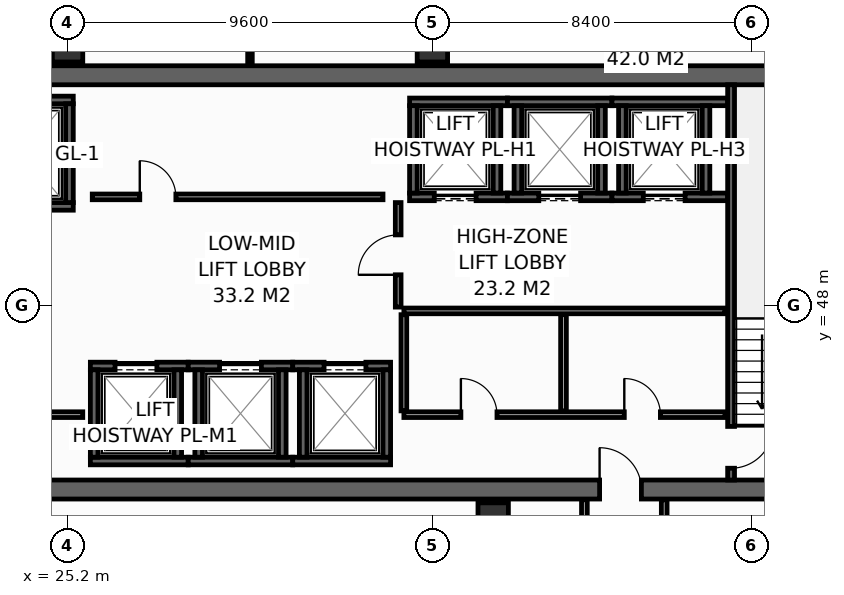
"""IFC4 building model, lengths in metres.
Left out: names, types, materials, properties, quantities, classifications, styles, units other than length and angle.
Written with IfcOpenShell. Run it as: python <this file> out.ifc"""

import sys

from ifc_helpers import new_model, si_unit, direction, frame, frame_2d, origin, origin_2d, place, context, subcontext, project, spatial, rectangle, hollow_rectangle, extrude, element, fill, save


model = new_model("IFC4")
c1 = context("Model", 3, precision=1e-05, world=origin(), true_north=direction((0.0, 1.0)))
c2 = subcontext(c1, "Body", "Model", "MODEL_VIEW")
j1 = project(units=[si_unit("LENGTHUNIT", "METRE"), si_unit("PLANEANGLEUNIT", "RADIAN")], contexts=[c1])
p1 = place(None, origin())
s1 = spatial("IfcSite", under=j1, at=p1, CompositionType="ELEMENT")
p2 = place(p1, origin())
s2 = spatial("IfcBuilding", under=s1, at=p2, CompositionType="ELEMENT")
p3 = place(p2, frame((0.0, 0.0, 220.8)))
s3 = spatial("IfcBuildingStorey", under=s2, at=p3, CompositionType="ELEMENT", Elevation=220.8)
p4 = place(p3, frame((13.6, 43.15, 0.0), z_axis=(0.0, 0.0, 1.0), x_axis=(1.0, 0.0, 0.0)))
e1 = element("IfcWall", 1, at=p4, inside=s3, PredefinedType="SHEAR", context=c2, shape_type="SweptSolid", body=[
    extrude(rectangle(XDim=32.7, YDim=0.5, at=frame_2d((16.35, 0.0))), origin(), (0.0, 0.0, 1.0), 3.35),
])
p5 = place(p4, frame((5.4, 0.0, 0.0)))
e2 = element("IfcOpeningElement", 2, at=p5, cuts=e1, PredefinedType="OPENING", context=c2, shape_type="SweptSolid", body=[
    extrude(rectangle(XDim=1.1, YDim=2.15, at=frame_2d((0.55, 1.075))), frame((0.0, 0.26, 0.0), z_axis=(0.0, -1.0, 0.0), x_axis=(1.0, 0.0, 0.0)), (0.0, 0.0, 1.0), 0.52),
])
p6 = place(p4, frame((25.6, 0.0, 0.0)))
e3 = element("IfcOpeningElement", 3, at=p6, cuts=e1, PredefinedType="OPENING", context=c2, shape_type="SweptSolid", body=[
    extrude(rectangle(XDim=1.1, YDim=2.15, at=frame_2d((0.55, 1.075))), frame((0.0, 0.26, 0.0), z_axis=(0.0, -1.0, 0.0), x_axis=(1.0, 0.0, 0.0)), (0.0, 0.0, 1.0), 0.52),
])
p7 = place(p3, frame((13.6, 54.05, 0.0), z_axis=(0.0, 0.0, 1.0), x_axis=(1.0, 0.0, 0.0)))
e4 = element("IfcWall", 4, at=p7, inside=s3, PredefinedType="SHEAR", context=c2, shape_type="SweptSolid", body=[
    extrude(rectangle(XDim=32.7, YDim=0.5, at=frame_2d((16.35, 0.0))), origin(), (0.0, 0.0, 1.0), 3.35),
])
for number, where, z_axis, x_axis in (
    (5, (25.2, 54.8, 0.0), (0.0, 0.0, 1.0), (1.0, 0.0, 0.0)),
    (6, (34.8, 54.8, 0.0), (0.0, 0.0, 1.0), (1.0, 0.0, 0.0)),
    (7, (36.4, 42.4, 0.0), (0.0, 0.0, 1.0), (1.0, 0.0, 0.0)),
):
    element("IfcColumn", number, at=place(p3, frame(where, z_axis=z_axis, x_axis=x_axis)), inside=s3, PredefinedType="COLUMN", context=c2, shape_type="SweptSolid", body=[
        extrude(hollow_rectangle(XDim=0.8, YDim=0.8, WallThickness=0.036, at=origin_2d()), origin(), (0.0, 0.0, 1.0), 3.8),
    ])
p8 = place(p3, frame((22.5, 50.6, 0.0), z_axis=(0.0, 0.0, 1.0), x_axis=(1.0, 0.0, 0.0)))
e8 = element("IfcWall", 8, at=p8, inside=s3, PredefinedType="SHEAR", context=c2, shape_type="SweptSolid", body=[
    extrude(rectangle(XDim=2.85, YDim=0.2, at=frame_2d((1.425, 0.0))), origin(), (0.0, 0.0, 1.0), 3.35),
])
p9 = place(p8, frame((0.925, 0.0, 0.0)))
e9 = element("IfcOpeningElement", 9, at=p9, cuts=e8, PredefinedType="OPENING", context=c2, shape_type="SweptSolid", body=[
    extrude(rectangle(XDim=1.25, YDim=2.3, at=frame_2d((0.625, 1.15))), frame((0.0, 0.11, 0.0), z_axis=(0.0, -1.0, 0.0), x_axis=(1.0, 0.0, 0.0)), (0.0, 0.0, 1.0), 0.22),
])
p10 = place(p3, frame((22.5, 53.4, 0.0), z_axis=(0.0, 0.0, 1.0), x_axis=(1.0, 0.0, 0.0)))
e10 = element("IfcWall", 10, at=p10, inside=s3, PredefinedType="SHEAR", context=c2, shape_type="SweptSolid", body=[
    extrude(rectangle(XDim=2.85, YDim=0.2, at=frame_2d((1.425, 0.0))), origin(), (0.0, 0.0, 1.0), 3.35),
])
p11 = place(p3, frame((25.25, 50.7, 0.0), z_axis=(0.0, 0.0, 1.0), x_axis=(0.0, 1.0, 0.0)))
e11 = element("IfcWall", 11, at=p11, inside=s3, PredefinedType="SHEAR", context=c2, shape_type="SweptSolid", body=[
    extrude(rectangle(XDim=2.6, YDim=0.2, at=frame_2d((1.3, 0.0))), origin(), (0.0, 0.0, 1.0), 3.35),
])
p12 = place(p3, frame((25.8, 43.9, 0.0), z_axis=(0.0, 0.0, 1.0), x_axis=(1.0, 0.0, 0.0)))
e12 = element("IfcWall", 12, at=p12, inside=s3, PredefinedType="SHEAR", context=c2, shape_type="SweptSolid", body=[
    extrude(rectangle(XDim=2.575, YDim=0.2, at=frame_2d((1.288, 0.0))), origin(), (0.0, 0.0, 1.0), 3.13),
])
p13 = place(p3, frame((25.8, 46.4, 0.0), z_axis=(0.0, 0.0, 1.0), x_axis=(1.0, 0.0, 0.0)))
e13 = element("IfcWall", 13, at=p13, inside=s3, PredefinedType="SHEAR", context=c2, shape_type="SweptSolid", body=[
    extrude(rectangle(XDim=2.575, YDim=0.2, at=frame_2d((1.288, 0.0))), origin(), (0.0, 0.0, 1.0), 3.13),
])
p14 = place(p13, frame((0.65, 0.0, 0.0)))
e14 = element("IfcOpeningElement", 14, at=p14, cuts=e13, PredefinedType="OPENING", context=c2, shape_type="SweptSolid", body=[
    extrude(rectangle(XDim=1.1, YDim=2.2, at=frame_2d((0.55, 1.1))), frame((0.0, 0.11, 0.0), z_axis=(0.0, -1.0, 0.0), x_axis=(1.0, 0.0, 0.0)), (0.0, 0.0, 1.0), 0.22),
])
for number, where, z_axis, x_axis in (
    (15, (25.9, 44.0, 0.0), (0.0, 0.0, 1.0), (0.0, 1.0, 0.0)),
    (16, (28.1, 44.0, 0.0), (0.0, 0.0, 1.0), (0.0, 1.0, 0.0)),
):
    element("IfcWall", number, at=place(p3, frame(where, z_axis=z_axis, x_axis=x_axis)), inside=s3, PredefinedType="SHEAR", context=c2, shape_type="SweptSolid", body=[
        extrude(rectangle(XDim=2.3, YDim=0.2, at=frame_2d((1.15, 0.0))), origin(), (0.0, 0.0, 1.0), 3.13),
    ])
p15 = place(p3, frame((28.375, 43.9, 0.0), z_axis=(0.0, 0.0, 1.0), x_axis=(1.0, 0.0, 0.0)))
e17 = element("IfcWall", 17, at=p15, inside=s3, PredefinedType="SHEAR", context=c2, shape_type="SweptSolid", body=[
    extrude(rectangle(XDim=2.75, YDim=0.2, at=frame_2d((1.375, 0.0))), origin(), (0.0, 0.0, 1.0), 3.13),
])
p16 = place(p3, frame((28.375, 46.4, 0.0), z_axis=(0.0, 0.0, 1.0), x_axis=(1.0, 0.0, 0.0)))
e18 = element("IfcWall", 18, at=p16, inside=s3, PredefinedType="SHEAR", context=c2, shape_type="SweptSolid", body=[
    extrude(rectangle(XDim=2.75, YDim=0.2, at=frame_2d((1.375, 0.0))), origin(), (0.0, 0.0, 1.0), 3.13),
])
p17 = place(p16, frame((0.825, 0.0, 0.0)))
e19 = element("IfcOpeningElement", 19, at=p17, cuts=e18, PredefinedType="OPENING", context=c2, shape_type="SweptSolid", body=[
    extrude(rectangle(XDim=1.1, YDim=2.2, at=frame_2d((0.55, 1.1))), frame((0.0, 0.11, 0.0), z_axis=(0.0, -1.0, 0.0), x_axis=(1.0, 0.0, 0.0)), (0.0, 0.0, 1.0), 0.22),
])
for number, where, z_axis, x_axis in (
    (20, (28.65, 44.0, 0.0), (0.0, 0.0, 1.0), (0.0, 1.0, 0.0)),
    (21, (30.85, 44.0, 0.0), (0.0, 0.0, 1.0), (0.0, 1.0, 0.0)),
):
    element("IfcWall", number, at=place(p3, frame(where, z_axis=z_axis, x_axis=x_axis)), inside=s3, PredefinedType="SHEAR", context=c2, shape_type="SweptSolid", body=[
        extrude(rectangle(XDim=2.3, YDim=0.2, at=frame_2d((1.15, 0.0))), origin(), (0.0, 0.0, 1.0), 3.13),
    ])
p18 = place(p3, frame((31.125, 43.9, 0.0), z_axis=(0.0, 0.0, 1.0), x_axis=(1.0, 0.0, 0.0)))
e22 = element("IfcWall", 22, at=p18, inside=s3, PredefinedType="SHEAR", context=c2, shape_type="SweptSolid", body=[
    extrude(rectangle(XDim=2.575, YDim=0.2, at=frame_2d((1.288, 0.0))), origin(), (0.0, 0.0, 1.0), 3.13),
])
p19 = place(p3, frame((31.125, 46.4, 0.0), z_axis=(0.0, 0.0, 1.0), x_axis=(1.0, 0.0, 0.0)))
e23 = element("IfcWall", 23, at=p19, inside=s3, PredefinedType="SHEAR", context=c2, shape_type="SweptSolid", body=[
    extrude(rectangle(XDim=2.575, YDim=0.2, at=frame_2d((1.288, 0.0))), origin(), (0.0, 0.0, 1.0), 3.13),
])
p20 = place(p19, frame((0.825, 0.0, 0.0)))
e24 = element("IfcOpeningElement", 24, at=p20, cuts=e23, PredefinedType="OPENING", context=c2, shape_type="SweptSolid", body=[
    extrude(rectangle(XDim=1.1, YDim=2.2, at=frame_2d((0.55, 1.1))), frame((0.0, 0.11, 0.0), z_axis=(0.0, -1.0, 0.0), x_axis=(1.0, 0.0, 0.0)), (0.0, 0.0, 1.0), 0.22),
])
for number, where, z_axis, x_axis in (
    (25, (31.4, 44.0, 0.0), (0.0, 0.0, 1.0), (0.0, 1.0, 0.0)),
    (26, (33.6, 44.0, 0.0), (0.0, 0.0, 1.0), (0.0, 1.0, 0.0)),
):
    element("IfcWall", number, at=place(p3, frame(where, z_axis=z_axis, x_axis=x_axis)), inside=s3, PredefinedType="SHEAR", context=c2, shape_type="SweptSolid", body=[
        extrude(rectangle(XDim=2.3, YDim=0.2, at=frame_2d((1.15, 0.0))), origin(), (0.0, 0.0, 1.0), 3.13),
    ])
p21 = place(p3, frame((34.2, 50.85, 0.0), z_axis=(0.0, 0.0, 1.0), x_axis=(1.0, 0.0, 0.0)))
e27 = element("IfcWall", 27, at=p21, inside=s3, PredefinedType="SHEAR", context=c2, shape_type="SweptSolid", body=[
    extrude(rectangle(XDim=2.575, YDim=0.2, at=frame_2d((1.288, 0.0))), origin(), (0.0, 0.0, 1.0), 3.35),
])
p22 = place(p21, frame((0.65, 0.0, 0.0)))
e28 = element("IfcOpeningElement", 28, at=p22, cuts=e27, PredefinedType="OPENING", context=c2, shape_type="SweptSolid", body=[
    extrude(rectangle(XDim=1.1, YDim=2.2, at=frame_2d((0.55, 1.1))), frame((0.0, 0.11, 0.0), z_axis=(0.0, -1.0, 0.0), x_axis=(1.0, 0.0, 0.0)), (0.0, 0.0, 1.0), 0.22),
])
p23 = place(p3, frame((34.2, 53.35, 0.0), z_axis=(0.0, 0.0, 1.0), x_axis=(1.0, 0.0, 0.0)))
e29 = element("IfcWall", 29, at=p23, inside=s3, PredefinedType="SHEAR", context=c2, shape_type="SweptSolid", body=[
    extrude(rectangle(XDim=2.575, YDim=0.2, at=frame_2d((1.288, 0.0))), origin(), (0.0, 0.0, 1.0), 3.35),
])
for number, where, z_axis, x_axis in (
    (30, (34.3, 50.95, 0.0), (0.0, 0.0, 1.0), (0.0, 1.0, 0.0)),
    (31, (36.5, 50.95, 0.0), (0.0, 0.0, 1.0), (0.0, 1.0, 0.0)),
):
    element("IfcWall", number, at=place(p3, frame(where, z_axis=z_axis, x_axis=x_axis)), inside=s3, PredefinedType="SHEAR", context=c2, shape_type="SweptSolid", body=[
        extrude(rectangle(XDim=2.3, YDim=0.2, at=frame_2d((1.15, 0.0))), origin(), (0.0, 0.0, 1.0), 3.35),
    ])
p24 = place(p3, frame((36.775, 50.85, 0.0), z_axis=(0.0, 0.0, 1.0), x_axis=(1.0, 0.0, 0.0)))
e32 = element("IfcWall", 32, at=p24, inside=s3, PredefinedType="SHEAR", context=c2, shape_type="SweptSolid", body=[
    extrude(rectangle(XDim=2.75, YDim=0.2, at=frame_2d((1.375, 0.0))), origin(), (0.0, 0.0, 1.0), 3.35),
])
p25 = place(p24, frame((0.825, 0.0, 0.0)))
e33 = element("IfcOpeningElement", 33, at=p25, cuts=e32, PredefinedType="OPENING", context=c2, shape_type="SweptSolid", body=[
    extrude(rectangle(XDim=1.1, YDim=2.2, at=frame_2d((0.55, 1.1))), frame((0.0, 0.11, 0.0), z_axis=(0.0, -1.0, 0.0), x_axis=(1.0, 0.0, 0.0)), (0.0, 0.0, 1.0), 0.22),
])
p26 = place(p3, frame((36.775, 53.35, 0.0), z_axis=(0.0, 0.0, 1.0), x_axis=(1.0, 0.0, 0.0)))
e34 = element("IfcWall", 34, at=p26, inside=s3, PredefinedType="SHEAR", context=c2, shape_type="SweptSolid", body=[
    extrude(rectangle(XDim=2.75, YDim=0.2, at=frame_2d((1.375, 0.0))), origin(), (0.0, 0.0, 1.0), 3.35),
])
for number, where, z_axis, x_axis in (
    (35, (37.05, 50.95, 0.0), (0.0, 0.0, 1.0), (0.0, 1.0, 0.0)),
    (36, (39.25, 50.95, 0.0), (0.0, 0.0, 1.0), (0.0, 1.0, 0.0)),
):
    element("IfcWall", number, at=place(p3, frame(where, z_axis=z_axis, x_axis=x_axis)), inside=s3, PredefinedType="SHEAR", context=c2, shape_type="SweptSolid", body=[
        extrude(rectangle(XDim=2.3, YDim=0.2, at=frame_2d((1.15, 0.0))), origin(), (0.0, 0.0, 1.0), 3.35),
    ])
p27 = place(p3, frame((39.525, 50.85, 0.0), z_axis=(0.0, 0.0, 1.0), x_axis=(1.0, 0.0, 0.0)))
e37 = element("IfcWall", 37, at=p27, inside=s3, PredefinedType="SHEAR", context=c2, shape_type="SweptSolid", body=[
    extrude(rectangle(XDim=3.045, YDim=0.2, at=frame_2d((1.522, 0.0))), origin(), (0.0, 0.0, 1.0), 3.35),
])
p28 = place(p27, frame((0.825, 0.0, 0.0)))
e38 = element("IfcOpeningElement", 38, at=p28, cuts=e37, PredefinedType="OPENING", context=c2, shape_type="SweptSolid", body=[
    extrude(rectangle(XDim=1.1, YDim=2.2, at=frame_2d((0.55, 1.1))), frame((0.0, 0.11, 0.0), z_axis=(0.0, -1.0, 0.0), x_axis=(1.0, 0.0, 0.0)), (0.0, 0.0, 1.0), 0.22),
])
p29 = place(p3, frame((39.525, 53.35, 0.0), z_axis=(0.0, 0.0, 1.0), x_axis=(1.0, 0.0, 0.0)))
e39 = element("IfcWall", 39, at=p29, inside=s3, PredefinedType="SHEAR", context=c2, shape_type="SweptSolid", body=[
    extrude(rectangle(XDim=3.045, YDim=0.2, at=frame_2d((1.522, 0.0))), origin(), (0.0, 0.0, 1.0), 3.35),
])
for number, where, z_axis, x_axis in (
    (40, (39.8, 50.95, 0.0), (0.0, 0.0, 1.0), (0.0, 1.0, 0.0)),
    (41, (42.0, 50.95, 0.0), (0.0, 0.0, 1.0), (0.0, 1.0, 0.0)),
):
    element("IfcWall", number, at=place(p3, frame(where, z_axis=z_axis, x_axis=x_axis)), inside=s3, PredefinedType="SHEAR", context=c2, shape_type="SweptSolid", body=[
        extrude(rectangle(XDim=2.3, YDim=0.2, at=frame_2d((1.15, 0.0))), origin(), (0.0, 0.0, 1.0), 3.35),
    ])
p30 = place(p3, frame((42.66, 53.8, 0.0), z_axis=(0.0, 0.0, 1.0), x_axis=(0.0, -1.0, 0.0)))
e42 = element("IfcWall", 42, at=p30, inside=s3, PredefinedType="SHEAR", context=c2, shape_type="SweptSolid", body=[
    extrude(rectangle(XDim=10.4, YDim=0.18, at=frame_2d((5.2, 0.0))), origin(), (0.0, 0.0, 1.0), 3.35),
])
p31 = place(p30, frame((8.99, 0.0, 0.0)))
e43 = element("IfcOpeningElement", 43, at=p31, cuts=e42, PredefinedType="OPENING", context=c2, shape_type="SweptSolid", body=[
    extrude(rectangle(XDim=1.1, YDim=2.15, at=frame_2d((0.55, 1.075))), frame((0.0, 0.1, 0.0), z_axis=(0.0, -1.0, 0.0), x_axis=(1.0, 0.0, 0.0)), (0.0, 0.0, 1.0), 0.2),
])
p32 = place(p3, frame((22.68, 45.12, 0.0), z_axis=(0.0, 0.0, 1.0), x_axis=(1.0, 0.0, 0.0)))
e44 = element("IfcWall", 44, at=p32, inside=s3, PredefinedType="PARTITIONING", context=c2, shape_type="SweptSolid", body=[
    extrude(rectangle(XDim=2.92, YDim=0.15, at=frame_2d((1.46, 0.0))), origin(), (0.0, 0.0, 1.0), 3.35),
])
p33 = place(p32, frame((0.85, 0.0, 0.0)))
e45 = element("IfcOpeningElement", 45, at=p33, cuts=e44, PredefinedType="OPENING", context=c2, shape_type="SweptSolid", body=[
    extrude(rectangle(XDim=1.1, YDim=2.15, at=frame_2d((0.55, 1.075))), frame((0.0, 0.085, 0.0), z_axis=(0.0, -1.0, 0.0), x_axis=(1.0, 0.0, 0.0)), (0.0, 0.0, 1.0), 0.17),
])
p34 = place(p3, frame((33.9, 47.95, 0.0), z_axis=(0.0, 0.0, 1.0), x_axis=(0.0, 1.0, 0.0)))
e46 = element("IfcWall", 46, at=p34, inside=s3, PredefinedType="PARTITIONING", context=c2, shape_type="SweptSolid", body=[
    extrude(rectangle(XDim=2.75, YDim=0.15, at=frame_2d((1.375, 0.0))), origin(), (0.0, 0.0, 1.0), 3.35),
])
p35 = place(p34, frame((0.85, 0.0, 0.0)))
e47 = element("IfcOpeningElement", 47, at=p35, cuts=e46, PredefinedType="OPENING", context=c2, shape_type="SweptSolid", body=[
    extrude(rectangle(XDim=1.05, YDim=2.15, at=frame_2d((0.525, 1.075))), frame((0.0, 0.085, 0.0), z_axis=(0.0, -1.0, 0.0), x_axis=(1.0, 0.0, 0.0)), (0.0, 0.0, 1.0), 0.17),
])
p36 = place(p3, frame((34.05, 45.12, 0.0), z_axis=(0.0, 0.0, 1.0), x_axis=(1.0, 0.0, 0.0)))
e48 = element("IfcWall", 48, at=p36, inside=s3, PredefinedType="PARTITIONING", context=c2, shape_type="SweptSolid", body=[
    extrude(rectangle(XDim=8.45, YDim=0.15, at=frame_2d((4.225, 0.0))), origin(), (0.0, 0.0, 1.0), 3.35),
])
p37 = place(p36, frame((1.5, 0.0, 0.0)))
e49 = element("IfcOpeningElement", 49, at=p37, cuts=e48, PredefinedType="OPENING", context=c2, shape_type="SweptSolid", body=[
    extrude(rectangle(XDim=0.95, YDim=2.15, at=frame_2d((0.475, 1.075))), frame((0.0, 0.085, 0.0), z_axis=(0.0, -1.0, 0.0), x_axis=(1.0, 0.0, 0.0)), (0.0, 0.0, 1.0), 0.17),
])
p38 = place(p36, frame((5.8, 0.0, 0.0)))
e50 = element("IfcOpeningElement", 50, at=p38, cuts=e48, PredefinedType="OPENING", context=c2, shape_type="SweptSolid", body=[
    extrude(rectangle(XDim=0.95, YDim=2.15, at=frame_2d((0.475, 1.075))), frame((0.0, 0.085, 0.0), z_axis=(0.0, -1.0, 0.0), x_axis=(1.0, 0.0, 0.0)), (0.0, 0.0, 1.0), 0.17),
])
p39 = place(p3, frame((34.05, 47.85, 0.0), z_axis=(0.0, 0.0, 1.0), x_axis=(1.0, 0.0, 0.0)))
e51 = element("IfcWall", 51, at=p39, inside=s3, PredefinedType="PARTITIONING", context=c2, shape_type="SweptSolid", body=[
    extrude(rectangle(XDim=8.45, YDim=0.15, at=frame_2d((4.225, 0.0))), origin(), (0.0, 0.0, 1.0), 3.35),
])
for number, where, z_axis, x_axis in (
    (52, (38.25, 45.22, 0.0), (0.0, 0.0, 1.0), (0.0, 1.0, 0.0)),
    (53, (34.05, 45.22, 0.0), (0.0, 0.0, 1.0), (0.0, 1.0, 0.0)),
):
    element("IfcWall", number, at=place(p3, frame(where, z_axis=z_axis, x_axis=x_axis)), inside=s3, PredefinedType="PARTITIONING", context=c2, shape_type="SweptSolid", body=[
        extrude(rectangle(XDim=2.53, YDim=0.15, at=frame_2d((1.265, 0.0))), origin(), (0.0, 0.0, 1.0), 3.35),
    ])
p40 = place(p3, frame((25.85, 50.85, 0.0), z_axis=(0.0, 0.0, 1.0), x_axis=(1.0, 0.0, 0.0)))
e54 = element("IfcWall", 54, at=p40, inside=s3, PredefinedType="PARTITIONING", context=c2, shape_type="SweptSolid", body=[
    extrude(rectangle(XDim=7.65, YDim=0.15, at=frame_2d((3.825, 0.0))), origin(), (0.0, 0.0, 1.0), 3.35),
])
p41 = place(p40, frame((1.25, 0.0, 0.0)))
e55 = element("IfcOpeningElement", 55, at=p41, cuts=e54, PredefinedType="OPENING", context=c2, shape_type="SweptSolid", body=[
    extrude(rectangle(XDim=0.95, YDim=2.15, at=frame_2d((0.475, 1.075))), frame((0.0, 0.085, 0.0), z_axis=(0.0, -1.0, 0.0), x_axis=(1.0, 0.0, 0.0)), (0.0, 0.0, 1.0), 0.17),
])
p42 = place(p3, frame((30.0, 54.32, 0.0), z_axis=(0.0, 0.0, 1.0), x_axis=(0.0, 1.0, 0.0)))
e56 = element("IfcWall", 56, at=p42, inside=s3, PredefinedType="PARTITIONING", context=c2, shape_type="SweptSolid", body=[
    extrude(rectangle(XDim=1.675, YDim=0.12, at=frame_2d((0.837, 0.0))), origin(), (0.0, 0.0, 1.0), 2.735),
])
for number, where, z_axis, x_axis in (
    (57, (38.8, 40.75, 0.0), (0.0, 0.0, 1.0), (0.0, 1.0, 0.0)),
    (58, (40.9, 40.75, 0.0), (0.0, 0.0, 1.0), (0.0, 1.0, 0.0)),
):
    element("IfcWall", number, at=place(p3, frame(where, z_axis=z_axis, x_axis=x_axis)), inside=s3, PredefinedType="PARTITIONING", context=c2, shape_type="SweptSolid", body=[
        extrude(rectangle(XDim=2.13, YDim=0.15, at=frame_2d((1.065, 0.0))), origin(), (0.0, 0.0, 1.0), 3.35),
    ])
p43 = place(p14, origin())
e59 = element("IfcDoor", 59, at=p43, inside=s3, OperationType="SLIDING_TO_LEFT", PredefinedType="DOOR", context=c2, shape_type="SweptSolid", body=[
    extrude(rectangle(XDim=1.1, YDim=2.2, at=frame_2d((0.55, 1.1))), frame((0.0, 0.025, 0.0), z_axis=(0.0, -1.0, 0.0), x_axis=(1.0, 0.0, 0.0)), (0.0, 0.0, 1.0), 0.05),
])
fill(e14, e59)
p44 = place(p17, origin())
e60 = element("IfcDoor", 60, at=p44, inside=s3, OperationType="SLIDING_TO_LEFT", PredefinedType="DOOR", context=c2, shape_type="SweptSolid", body=[
    extrude(rectangle(XDim=1.1, YDim=2.2, at=frame_2d((0.55, 1.1))), frame((0.0, 0.025, 0.0), z_axis=(0.0, -1.0, 0.0), x_axis=(1.0, 0.0, 0.0)), (0.0, 0.0, 1.0), 0.05),
])
fill(e19, e60)
p45 = place(p20, origin())
e61 = element("IfcDoor", 61, at=p45, inside=s3, OperationType="SLIDING_TO_LEFT", PredefinedType="DOOR", context=c2, shape_type="SweptSolid", body=[
    extrude(rectangle(XDim=1.1, YDim=2.2, at=frame_2d((0.55, 1.1))), frame((0.0, 0.025, 0.0), z_axis=(0.0, -1.0, 0.0), x_axis=(1.0, 0.0, 0.0)), (0.0, 0.0, 1.0), 0.05),
])
fill(e24, e61)
p46 = place(p22, origin())
e62 = element("IfcDoor", 62, at=p46, inside=s3, OperationType="SLIDING_TO_LEFT", PredefinedType="DOOR", context=c2, shape_type="SweptSolid", body=[
    extrude(rectangle(XDim=1.1, YDim=2.2, at=frame_2d((0.55, 1.1))), frame((0.0, 0.025, 0.0), z_axis=(0.0, -1.0, 0.0), x_axis=(1.0, 0.0, 0.0)), (0.0, 0.0, 1.0), 0.05),
])
fill(e28, e62)
p47 = place(p25, origin())
e63 = element("IfcDoor", 63, at=p47, inside=s3, OperationType="SLIDING_TO_LEFT", PredefinedType="DOOR", context=c2, shape_type="SweptSolid", body=[
    extrude(rectangle(XDim=1.1, YDim=2.2, at=frame_2d((0.55, 1.1))), frame((0.0, 0.025, 0.0), z_axis=(0.0, -1.0, 0.0), x_axis=(1.0, 0.0, 0.0)), (0.0, 0.0, 1.0), 0.05),
])
fill(e33, e63)
p48 = place(p28, origin())
e64 = element("IfcDoor", 64, at=p48, inside=s3, OperationType="SLIDING_TO_LEFT", PredefinedType="DOOR", context=c2, shape_type="SweptSolid", body=[
    extrude(rectangle(XDim=1.1, YDim=2.2, at=frame_2d((0.55, 1.1))), frame((0.0, 0.025, 0.0), z_axis=(0.0, -1.0, 0.0), x_axis=(1.0, 0.0, 0.0)), (0.0, 0.0, 1.0), 0.05),
])
fill(e38, e64)
p49 = place(p31, origin())
e65 = element("IfcDoor", 65, at=p49, inside=s3, OperationType="SINGLE_SWING_LEFT", PredefinedType="DOOR", context=c2, shape_type="SweptSolid", body=[
    extrude(rectangle(XDim=1.1, YDim=2.15, at=frame_2d((0.55, 1.075))), frame((0.0, 0.025, 0.0), z_axis=(0.0, -1.0, 0.0), x_axis=(1.0, 0.0, 0.0)), (0.0, 0.0, 1.0), 0.05),
])
fill(e43, e65)
p50 = place(p6, origin())
e66 = element("IfcDoor", 66, at=p50, inside=s3, OperationType="SINGLE_SWING_LEFT", PredefinedType="DOOR", context=c2, shape_type="SweptSolid", body=[
    extrude(rectangle(XDim=1.1, YDim=2.15, at=frame_2d((0.55, 1.075))), frame((0.0, 0.025, 0.0), z_axis=(0.0, -1.0, 0.0), x_axis=(1.0, 0.0, 0.0)), (0.0, 0.0, 1.0), 0.05),
])
fill(e3, e66)
p51 = place(p35, origin())
e67 = element("IfcDoor", 67, at=p51, inside=s3, OperationType="SINGLE_SWING_LEFT", PredefinedType="DOOR", context=c2, shape_type="SweptSolid", body=[
    extrude(rectangle(XDim=1.05, YDim=2.15, at=frame_2d((0.525, 1.075))), frame((0.0, 0.025, 0.0), z_axis=(0.0, -1.0, 0.0), x_axis=(1.0, 0.0, 0.0)), (0.0, 0.0, 1.0), 0.05),
])
fill(e47, e67)
p52 = place(p37, origin())
e68 = element("IfcDoor", 68, at=p52, inside=s3, OperationType="SINGLE_SWING_LEFT", PredefinedType="DOOR", context=c2, shape_type="SweptSolid", body=[
    extrude(rectangle(XDim=0.95, YDim=2.15, at=frame_2d((0.475, 1.075))), frame((0.0, 0.025, 0.0), z_axis=(0.0, -1.0, 0.0), x_axis=(1.0, 0.0, 0.0)), (0.0, 0.0, 1.0), 0.05),
])
fill(e49, e68)
p53 = place(p38, origin())
e69 = element("IfcDoor", 69, at=p53, inside=s3, OperationType="SINGLE_SWING_LEFT", PredefinedType="DOOR", context=c2, shape_type="SweptSolid", body=[
    extrude(rectangle(XDim=0.95, YDim=2.15, at=frame_2d((0.475, 1.075))), frame((0.0, 0.025, 0.0), z_axis=(0.0, -1.0, 0.0), x_axis=(1.0, 0.0, 0.0)), (0.0, 0.0, 1.0), 0.05),
])
fill(e50, e69)
p54 = place(p41, origin())
e70 = element("IfcDoor", 70, at=p54, inside=s3, OperationType="SINGLE_SWING_LEFT", PredefinedType="DOOR", context=c2, shape_type="SweptSolid", body=[
    extrude(rectangle(XDim=0.95, YDim=2.15, at=frame_2d((0.475, 1.075))), frame((0.0, 0.025, 0.0), z_axis=(0.0, -1.0, 0.0), x_axis=(1.0, 0.0, 0.0)), (0.0, 0.0, 1.0), 0.05),
])
fill(e55, e70)
save(model, sys.argv[1])
